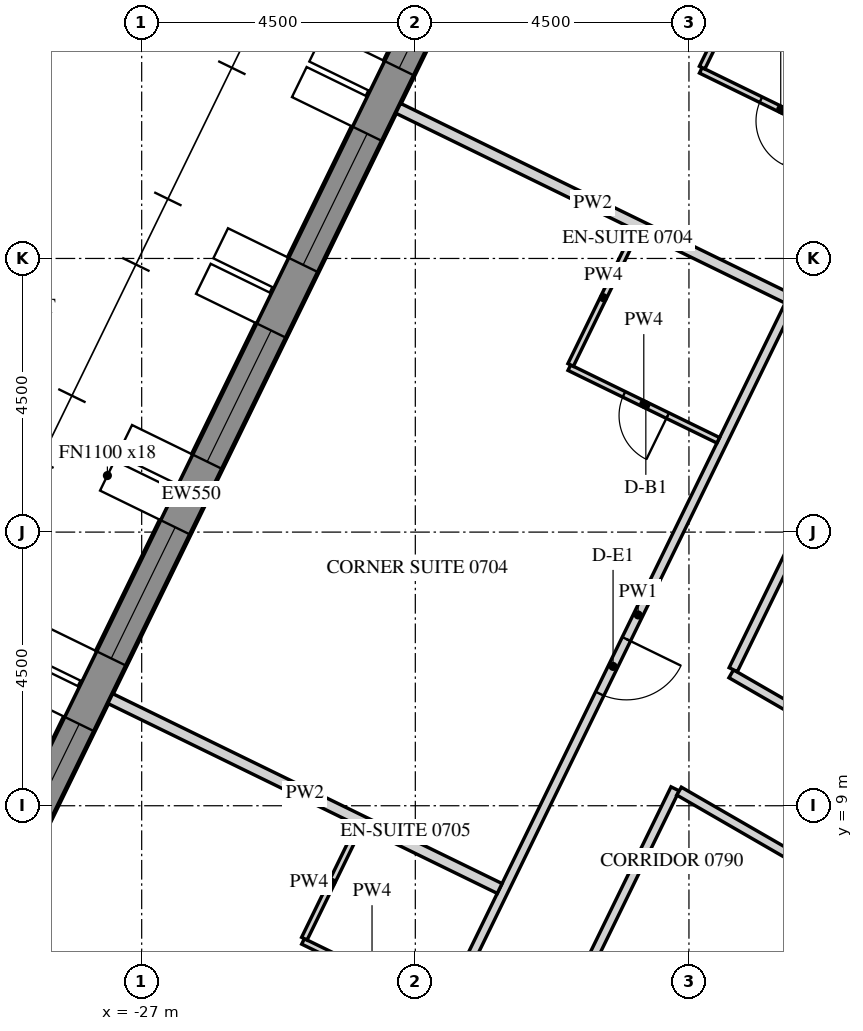
"""IFC4 building model, lengths in metres.
Left out: names, types, materials, properties, quantities, classifications, styles, units other than length and angle.
Written with IfcOpenShell. Run it as: python <this file> out.ifc"""

import sys

from ifc_helpers import new_model, si_unit, direction, frame, frame_2d, origin, place, context, subcontext, project, spatial, polyline, rectangle, outline, extrude, element, fill, save


model = new_model("IFC4")
c1 = context("Model", 3, precision=1e-05, world=origin(), true_north=direction((0.0, 1.0)))
c2 = subcontext(c1, "Body", "Model", "MODEL_VIEW")
j1 = project(units=[si_unit("LENGTHUNIT", "METRE"), si_unit("PLANEANGLEUNIT", "RADIAN")], contexts=[c1])
p1 = place(None, origin())
s1 = spatial("IfcSite", under=j1, at=p1, CompositionType="ELEMENT")
p2 = place(p1, origin())
s2 = spatial("IfcBuilding", under=s1, at=p2, CompositionType="ELEMENT")
p3 = place(p2, frame((0.0, 0.0, 99.9)))
s3 = spatial("IfcBuildingStorey", under=s2, at=p3, CompositionType="ELEMENT", Elevation=99.9)
p4 = place(p3, frame((-19.595, 27.633, -0.15), z_axis=(0.0, 0.0, 1.0), x_axis=(-0.438368285794, -0.898795441694, 0.0)))
e1 = element("IfcWall", 1, at=p4, inside=s3, PredefinedType="SOLIDWALL", context=c2, shape_type="SweptSolid", body=[
    extrude(outline(polyline([(-0.026, -0.275), (30.093, -0.275), (30.048, 0.275), (0.026, 0.275), (-0.026, -0.275)])), origin(), (0.0, 0.0, 1.0), 3.9),
])
p5 = place(p4, frame((1.236, 0.0, 1.05)))
e2 = element("IfcOpeningElement", 2, at=p5, cuts=e1, PredefinedType="OPENING", context=c2, shape_type="SweptSolid", body=[
    extrude(rectangle(XDim=2.4, YDim=2.4, at=frame_2d((1.2, 1.2))), frame((0.0, 0.285, 0.0), z_axis=(0.0, -1.0, 0.0), x_axis=(1.0, 0.0, 0.0)), (0.0, 0.0, 1.0), 0.57),
])
p6 = place(p4, frame((4.835, 0.0, 1.05)))
e3 = element("IfcOpeningElement", 3, at=p6, cuts=e1, PredefinedType="OPENING", context=c2, shape_type="SweptSolid", body=[
    extrude(rectangle(XDim=2.4, YDim=2.4, at=frame_2d((1.2, 1.2))), frame((0.0, 0.285, 0.0), z_axis=(0.0, -1.0, 0.0), x_axis=(1.0, 0.0, 0.0)), (0.0, 0.0, 1.0), 0.57),
])
p7 = place(p4, frame((8.436, 0.0, 1.05)))
e4 = element("IfcOpeningElement", 4, at=p7, cuts=e1, PredefinedType="OPENING", context=c2, shape_type="SweptSolid", body=[
    extrude(rectangle(XDim=2.4, YDim=2.4, at=frame_2d((1.2, 1.2))), frame((0.0, 0.285, 0.0), z_axis=(0.0, -1.0, 0.0), x_axis=(1.0, 0.0, 0.0)), (0.0, 0.0, 1.0), 0.57),
])
p8 = place(p4, frame((12.035, 0.0, 1.05)))
e5 = element("IfcOpeningElement", 5, at=p8, cuts=e1, PredefinedType="OPENING", context=c2, shape_type="SweptSolid", body=[
    extrude(rectangle(XDim=2.4, YDim=2.4, at=frame_2d((1.2, 1.2))), frame((0.0, 0.285, 0.0), z_axis=(0.0, -1.0, 0.0), x_axis=(1.0, 0.0, 0.0)), (0.0, 0.0, 1.0), 0.57),
])
p9 = place(p4, frame((15.635, 0.0, 1.05)))
e6 = element("IfcOpeningElement", 6, at=p9, cuts=e1, PredefinedType="OPENING", context=c2, shape_type="SweptSolid", body=[
    extrude(rectangle(XDim=2.4, YDim=2.4, at=frame_2d((1.2, 1.2))), frame((0.0, 0.285, 0.0), z_axis=(0.0, -1.0, 0.0), x_axis=(1.0, 0.0, 0.0)), (0.0, 0.0, 1.0), 0.57),
])
p10 = place(p4, frame((19.236, 0.0, 1.05)))
e7 = element("IfcOpeningElement", 7, at=p10, cuts=e1, PredefinedType="OPENING", context=c2, shape_type="SweptSolid", body=[
    extrude(rectangle(XDim=2.4, YDim=2.4, at=frame_2d((1.2, 1.2))), frame((0.0, 0.285, 0.0), z_axis=(0.0, -1.0, 0.0), x_axis=(1.0, 0.0, 0.0)), (0.0, 0.0, 1.0), 0.57),
])
p11 = place(p4, frame((22.835, 0.0, 1.05)))
e8 = element("IfcOpeningElement", 8, at=p11, cuts=e1, PredefinedType="OPENING", context=c2, shape_type="SweptSolid", body=[
    extrude(rectangle(XDim=2.4, YDim=2.4, at=frame_2d((1.2, 1.2))), frame((0.0, 0.285, 0.0), z_axis=(0.0, -1.0, 0.0), x_axis=(1.0, 0.0, 0.0)), (0.0, 0.0, 1.0), 0.57),
])
p12 = place(p4, frame((26.436, 0.0, 1.05)))
e9 = element("IfcOpeningElement", 9, at=p12, cuts=e1, PredefinedType="OPENING", context=c2, shape_type="SweptSolid", body=[
    extrude(rectangle(XDim=2.4, YDim=2.4, at=frame_2d((1.2, 1.2))), frame((0.0, 0.285, 0.0), z_axis=(0.0, -1.0, 0.0), x_axis=(1.0, 0.0, 0.0)), (0.0, 0.0, 1.0), 0.57),
])
p13 = place(p3, frame((-13.94, 22.175, 0.0), z_axis=(0.0, 0.0, 1.0), x_axis=(-0.438373022655, -0.898793131376, 0.0)))
e10 = element("IfcWall", 10, at=p13, inside=s3, PredefinedType="PARTITIONING", context=c2, shape_type="SweptSolid", body=[
    extrude(rectangle(XDim=22.335, YDim=0.15, at=frame_2d((11.168, 0.0))), origin(), (0.0, 0.0, 1.0), 2.988),
])
p14 = place(p13, frame((3.363, 0.0, 0.0)))
e11 = element("IfcOpeningElement", 11, at=p14, cuts=e10, PredefinedType="OPENING", context=c2, shape_type="SweptSolid", body=[
    extrude(rectangle(XDim=1.0, YDim=2.1, at=frame_2d((0.5, 1.05))), frame((0.0, 0.085, 0.0), z_axis=(0.0, -1.0, 0.0), x_axis=(1.0, 0.0, 0.0)), (0.0, 0.0, 1.0), 0.17),
])
p15 = place(p13, frame((11.609, 0.0, 0.0)))
e12 = element("IfcOpeningElement", 12, at=p15, cuts=e10, PredefinedType="OPENING", context=c2, shape_type="SweptSolid", body=[
    extrude(rectangle(XDim=1.0, YDim=2.1, at=frame_2d((0.5, 1.05))), frame((0.0, 0.085, 0.0), z_axis=(0.0, -1.0, 0.0), x_axis=(1.0, 0.0, 0.0)), (0.0, 0.0, 1.0), 0.17),
])
p16 = place(p13, frame((19.872, 0.0, 0.0)))
e13 = element("IfcOpeningElement", 13, at=p16, cuts=e10, PredefinedType="OPENING", context=c2, shape_type="SweptSolid", body=[
    extrude(rectangle(XDim=1.0, YDim=2.1, at=frame_2d((0.5, 1.05))), frame((0.0, 0.085, 0.0), z_axis=(0.0, -1.0, 0.0), x_axis=(1.0, 0.0, 0.0)), (0.0, 0.0, 1.0), 0.17),
])
p17 = place(p3, frame((-11.614, 7.884, 0.0), z_axis=(0.0, 0.0, 1.0), x_axis=(-0.866025963225, 0.49999903102, 0.0)))
e14 = element("IfcWall", 14, at=p17, inside=s3, PredefinedType="PARTITIONING", context=c2, shape_type="SweptSolid", body=[
    extrude(rectangle(XDim=6.571, YDim=0.15, at=frame_2d((3.286, 0.0))), origin(), (0.0, 0.0, 1.0), 2.988),
])
p18 = place(p3, frame((-17.272, 11.238, 0.0), z_axis=(0.0, 0.0, 1.0), x_axis=(0.438369193793, 0.898794998836, 0.0)))
e15 = element("IfcWall", 15, at=p18, inside=s3, PredefinedType="PARTITIONING", context=c2, shape_type="SweptSolid", body=[
    extrude(rectangle(XDim=10.25, YDim=0.15, at=frame_2d((5.125, 0.0))), origin(), (0.0, 0.0, 1.0), 2.988),
])
p19 = place(p3, frame((-22.553, 0.41, 0.0), z_axis=(0.0, 0.0, 1.0), x_axis=(0.438382679221, 0.898788421465, 0.0)))
e16 = element("IfcWall", 16, at=p19, inside=s3, PredefinedType="PARTITIONING", context=c2, shape_type="SweptSolid", body=[
    extrude(rectangle(XDim=9.866, YDim=0.15, at=frame_2d((4.933, 0.0))), origin(), (0.0, 0.0, 1.0), 2.988),
])
p20 = place(p19, frame((4.483, 0.0, 0.0)))
e17 = element("IfcOpeningElement", 17, at=p20, cuts=e16, PredefinedType="OPENING", context=c2, shape_type="SweptSolid", body=[
    extrude(rectangle(XDim=0.9, YDim=2.1, at=frame_2d((0.45, 1.05))), frame((0.0, 0.085, 0.0), z_axis=(0.0, -1.0, 0.0), x_axis=(1.0, 0.0, 0.0)), (0.0, 0.0, 1.0), 0.17),
])
p21 = place(p3, frame((-18.162, 9.24, 0.0), z_axis=(0.0, 0.0, 1.0), x_axis=(0.866026781814, -0.499997613175, 0.0)))
e18 = element("IfcWall", 18, at=p21, inside=s3, PredefinedType="PARTITIONING", context=c2, shape_type="SweptSolid", body=[
    extrude(rectangle(XDim=6.349, YDim=0.15, at=frame_2d((3.175, 0.0))), origin(), (0.0, 0.0, 1.0), 2.988),
])
p22 = place(p3, frame((-15.176, 19.811, 0.0), z_axis=(0.0, 0.0, 1.0), x_axis=(-0.898790906006, 0.438377585285, 0.0)))
e19 = element("IfcWall", 19, at=p22, inside=s3, PredefinedType="PARTITIONING", context=c2, shape_type="SweptSolid", body=[
    extrude(rectangle(XDim=2.925, YDim=0.1, at=frame_2d((1.462, 0.0))), origin(), (0.0, 0.0, 1.0), 2.988),
])
p23 = place(p22, frame((1.025, 0.0, 0.0)))
e20 = element("IfcOpeningElement", 20, at=p23, cuts=e19, PredefinedType="OPENING", context=c2, shape_type="SweptSolid", body=[
    extrude(rectangle(XDim=0.8, YDim=2.1, at=frame_2d((0.4, 1.05))), frame((0.0, 0.06, 0.0), z_axis=(0.0, -1.0, 0.0), x_axis=(1.0, 0.0, 0.0)), (0.0, 0.0, 1.0), 0.12),
])
p24 = place(p3, frame((-17.783, 21.138, 0.0), z_axis=(0.0, 0.0, 1.0), x_axis=(0.438339704034, 0.898809381275, 0.0)))
e21 = element("IfcWall", 21, at=p24, inside=s3, PredefinedType="PARTITIONING", context=c2, shape_type="SweptSolid", body=[
    extrude(rectangle(XDim=2.35, YDim=0.1, at=frame_2d((1.175, 0.0))), origin(), (0.0, 0.0, 1.0), 2.988),
])
p25 = place(p3, frame((-22.782, 20.47, 0.0), z_axis=(0.0, 0.0, 1.0), x_axis=(0.898783593711, -0.438392577123, 0.0)))
e22 = element("IfcWall", 22, at=p25, inside=s3, PredefinedType="PARTITIONING", context=c2, shape_type="SweptSolid", body=[
    extrude(rectangle(XDim=7.125, YDim=0.18, at=frame_2d((3.562, 0.0))), origin(), (0.0, 0.0, 1.0), 2.988),
])
p26 = place(p3, frame((-17.518, 15.01, 0.0), z_axis=(0.0, 0.0, 1.0), x_axis=(-0.898791692788, 0.43837597217, 0.0)))
e23 = element("IfcWall", 23, at=p26, inside=s3, PredefinedType="PARTITIONING", context=c2, shape_type="SweptSolid", body=[
    extrude(rectangle(XDim=2.725, YDim=0.1, at=frame_2d((1.363, 0.0))), origin(), (0.0, 0.0, 1.0), 2.988),
])
p27 = place(p26, frame((0.925, 0.0, 0.0)))
e24 = element("IfcOpeningElement", 24, at=p27, cuts=e23, PredefinedType="OPENING", context=c2, shape_type="SweptSolid", body=[
    extrude(rectangle(XDim=0.8, YDim=2.1, at=frame_2d((0.4, 1.05))), frame((0.0, 0.06, 0.0), z_axis=(0.0, -1.0, 0.0), x_axis=(1.0, 0.0, 0.0)), (0.0, 0.0, 1.0), 0.12),
])
p28 = place(p3, frame((-19.946, 16.249, 0.0), z_axis=(0.0, 0.0, 1.0), x_axis=(0.438419721753, 0.898770353082, 0.0)))
e25 = element("IfcWall", 25, at=p28, inside=s3, PredefinedType="PARTITIONING", context=c2, shape_type="SweptSolid", body=[
    extrude(rectangle(XDim=2.46, YDim=0.1, at=frame_2d((1.23, 0.0))), origin(), (0.0, 0.0, 1.0), 2.988),
])
p29 = place(p3, frame((-27.517, 10.763, 0.0), z_axis=(0.0, 0.0, 1.0), x_axis=(0.898783593711, -0.438392577123, 0.0)))
e26 = element("IfcWall", 26, at=p29, inside=s3, PredefinedType="PARTITIONING", context=c2, shape_type="SweptSolid", body=[
    extrude(rectangle(XDim=7.125, YDim=0.18, at=frame_2d((3.562, 0.0))), origin(), (0.0, 0.0, 1.0), 2.988),
])
p30 = place(p3, frame((-22.077, 5.662, 0.0), z_axis=(0.0, 0.0, 1.0), x_axis=(-0.898792604152, 0.438374103617, 0.0)))
e27 = element("IfcWall", 27, at=p30, inside=s3, PredefinedType="PARTITIONING", context=c2, shape_type="SweptSolid", body=[
    extrude(rectangle(XDim=2.525, YDim=0.1, at=frame_2d((1.263, 0.0))), origin(), (0.0, 0.0, 1.0), 2.988),
])
p31 = place(p30, frame((0.955, 0.0, 0.0)))
e28 = element("IfcOpeningElement", 28, at=p31, cuts=e27, PredefinedType="OPENING", context=c2, shape_type="SweptSolid", body=[
    extrude(rectangle(XDim=0.8, YDim=2.1, at=frame_2d((0.4, 1.05))), frame((0.0, 0.06, 0.0), z_axis=(0.0, -1.0, 0.0), x_axis=(1.0, 0.0, 0.0)), (0.0, 0.0, 1.0), 0.12),
])
p32 = place(p3, frame((-24.325, 6.814, 0.0), z_axis=(0.0, 0.0, 1.0), x_axis=(0.438374597956, 0.898792363044, 0.0)))
e29 = element("IfcWall", 29, at=p32, inside=s3, PredefinedType="PARTITIONING", context=c2, shape_type="SweptSolid", body=[
    extrude(rectangle(XDim=2.06, YDim=0.1, at=frame_2d((1.03, 0.0))), origin(), (0.0, 0.0, 1.0), 2.988),
])
p33 = place(p6, frame((0.0, 0.205, 0.0)))
e30 = element("IfcWindow", 30, at=p33, inside=s3, PartitioningType="DOUBLE_PANEL_VERTICAL", PredefinedType="WINDOW", context=c2, shape_type="SweptSolid", body=[
    extrude(rectangle(XDim=2.4, YDim=2.4, at=frame_2d((1.2, 1.2))), frame((0.0, 0.03, 0.0), z_axis=(0.0, -1.0, 0.0), x_axis=(1.0, 0.0, 0.0)), (0.0, 0.0, 1.0), 0.06),
])
fill(e3, e30)
p34 = place(p7, frame((0.0, 0.205, 0.0)))
e31 = element("IfcWindow", 31, at=p34, inside=s3, PartitioningType="DOUBLE_PANEL_VERTICAL", PredefinedType="WINDOW", context=c2, shape_type="SweptSolid", body=[
    extrude(rectangle(XDim=2.4, YDim=2.4, at=frame_2d((1.2, 1.2))), frame((0.0, 0.03, 0.0), z_axis=(0.0, -1.0, 0.0), x_axis=(1.0, 0.0, 0.0)), (0.0, 0.0, 1.0), 0.06),
])
fill(e4, e31)
p35 = place(p8, frame((0.0, 0.205, 0.0)))
e32 = element("IfcWindow", 32, at=p35, inside=s3, PartitioningType="DOUBLE_PANEL_VERTICAL", PredefinedType="WINDOW", context=c2, shape_type="SweptSolid", body=[
    extrude(rectangle(XDim=2.4, YDim=2.4, at=frame_2d((1.2, 1.2))), frame((0.0, 0.03, 0.0), z_axis=(0.0, -1.0, 0.0), x_axis=(1.0, 0.0, 0.0)), (0.0, 0.0, 1.0), 0.06),
])
fill(e5, e32)
p36 = place(p9, frame((0.0, 0.205, 0.0)))
e33 = element("IfcWindow", 33, at=p36, inside=s3, PartitioningType="DOUBLE_PANEL_VERTICAL", PredefinedType="WINDOW", context=c2, shape_type="SweptSolid", body=[
    extrude(rectangle(XDim=2.4, YDim=2.4, at=frame_2d((1.2, 1.2))), frame((0.0, 0.03, 0.0), z_axis=(0.0, -1.0, 0.0), x_axis=(1.0, 0.0, 0.0)), (0.0, 0.0, 1.0), 0.06),
])
fill(e6, e33)
p37 = place(p10, frame((0.0, 0.205, 0.0)))
e34 = element("IfcWindow", 34, at=p37, inside=s3, PartitioningType="DOUBLE_PANEL_VERTICAL", PredefinedType="WINDOW", context=c2, shape_type="SweptSolid", body=[
    extrude(rectangle(XDim=2.4, YDim=2.4, at=frame_2d((1.2, 1.2))), frame((0.0, 0.03, 0.0), z_axis=(0.0, -1.0, 0.0), x_axis=(1.0, 0.0, 0.0)), (0.0, 0.0, 1.0), 0.06),
])
fill(e7, e34)
p38 = place(p23, origin())
e35 = element("IfcDoor", 35, at=p38, inside=s3, OperationType="SINGLE_SWING_RIGHT", PredefinedType="DOOR", context=c2, shape_type="SweptSolid", body=[
    extrude(rectangle(XDim=0.8, YDim=2.1, at=frame_2d((0.4, 1.05))), frame((0.0, 0.025, 0.0), z_axis=(0.0, -1.0, 0.0), x_axis=(1.0, 0.0, 0.0)), (0.0, 0.0, 1.0), 0.05),
])
fill(e20, e35)
p39 = place(p15, origin())
e36 = element("IfcDoor", 36, at=p39, inside=s3, OperationType="SINGLE_SWING_LEFT", PredefinedType="DOOR", context=c2, shape_type="SweptSolid", body=[
    extrude(rectangle(XDim=1.0, YDim=2.1, at=frame_2d((0.5, 1.05))), frame((0.0, 0.025, 0.0), z_axis=(0.0, -1.0, 0.0), x_axis=(1.0, 0.0, 0.0)), (0.0, 0.0, 1.0), 0.05),
])
fill(e12, e36)
p40 = place(p27, origin())
e37 = element("IfcDoor", 37, at=p40, inside=s3, OperationType="SINGLE_SWING_RIGHT", PredefinedType="DOOR", context=c2, shape_type="SweptSolid", body=[
    extrude(rectangle(XDim=0.8, YDim=2.1, at=frame_2d((0.4, 1.05))), frame((0.0, 0.025, 0.0), z_axis=(0.0, -1.0, 0.0), x_axis=(1.0, 0.0, 0.0)), (0.0, 0.0, 1.0), 0.05),
])
fill(e24, e37)
save(model, sys.argv[1])
